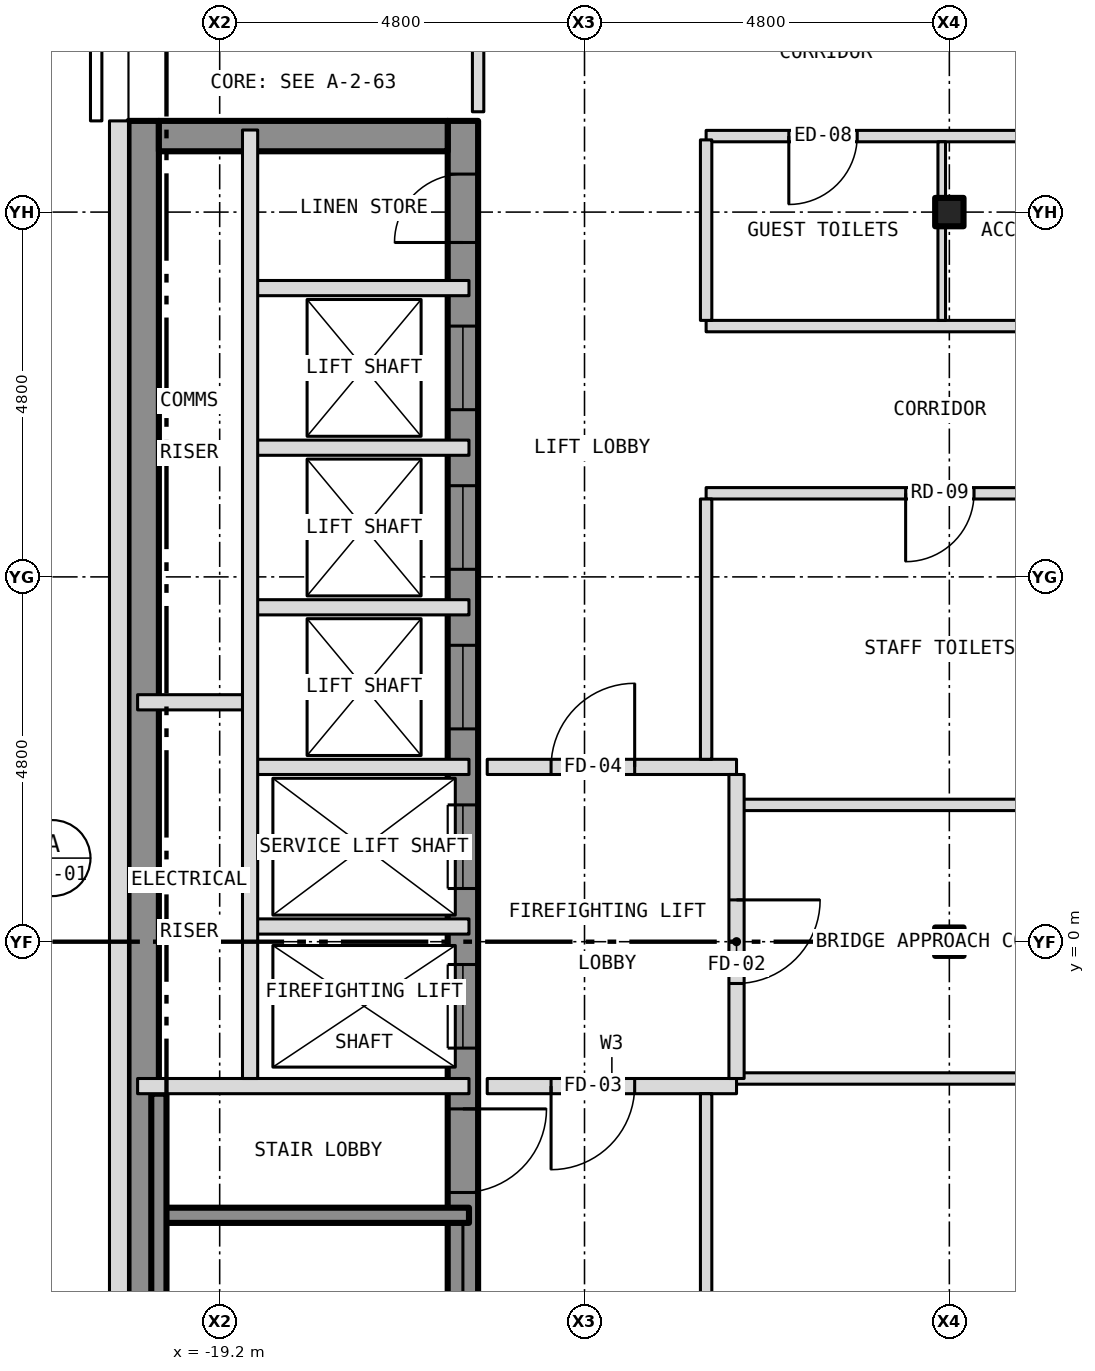
"""IFC4 building model, lengths in metres.
Left out: names, types, materials, properties, quantities, classifications, styles, units other than length and angle.
Written with IfcOpenShell. Run it as: python <this file> out.ifc"""

import sys

from ifc_helpers import new_model, si_unit, direction, frame, frame_2d, origin, origin_2d, place, context, subcontext, project, spatial, rectangle, i_section, extrude, element, fill, save


model = new_model("IFC4")
c1 = context("Model", 3, precision=1e-05, world=origin(), true_north=direction((0.0, 1.0)))
c2 = subcontext(c1, "Body", "Model", "MODEL_VIEW")
j1 = project(units=[si_unit("LENGTHUNIT", "METRE"), si_unit("PLANEANGLEUNIT", "RADIAN")], contexts=[c1])
p1 = place(None, origin())
s1 = spatial("IfcSite", under=j1, at=p1, CompositionType="ELEMENT")
p2 = place(p1, origin())
s2 = spatial("IfcBuilding", under=s1, at=p2, CompositionType="ELEMENT")
p3 = place(p2, frame((0.0, 0.0, 229.5)))
s3 = spatial("IfcBuildingStorey", under=s2, at=p3, CompositionType="ELEMENT", Elevation=229.5)
for number, where, z_axis, x_axis in (
    (1, (-9.6, 0.0, -0.15), (0.0, 0.0, 1.0), (1.0, 0.0, 0.0)),
    (2, (-9.6, 9.6, -0.15), (0.0, 0.0, 1.0), (1.0, 0.0, 0.0)),
):
    element("IfcColumn", number, at=place(p3, frame(where, z_axis=z_axis, x_axis=x_axis)), inside=s3, PredefinedType="COLUMN", context=c2, shape_type="SweptSolid", body=[
        extrude(i_section(OverallWidth=0.373, OverallDepth=0.373, WebThickness=0.016, FlangeThickness=0.026, at=origin_2d()), origin(), (0.0, 0.0, 1.0), 3.5),
    ])
p4 = place(p3, frame((-16.0, -10.8, 0.0), z_axis=(0.0, 0.0, 1.0), x_axis=(0.0, 1.0, 0.0)))
e3 = element("IfcWall", 3, at=p4, inside=s3, PredefinedType="SHEAR", context=c2, shape_type="SweptSolid", body=[
    extrude(rectangle(XDim=21.6, YDim=0.4, at=frame_2d((10.8, 0.0))), origin(), (0.0, 0.0, 1.0), 3.25),
])
p5 = place(p4, frame((9.4, 0.0, 0.0)))
e4 = element("IfcOpeningElement", 4, at=p5, cuts=e3, PredefinedType="OPENING", context=c2, shape_type="SweptSolid", body=[
    extrude(rectangle(XDim=1.1, YDim=2.1, at=frame_2d((0.55, 1.05))), frame((0.0, 0.212, 0.0), z_axis=(0.0, -1.0, 0.0), x_axis=(1.0, 0.0, 0.0)), (0.0, 0.0, 1.0), 0.424),
])
p6 = place(p4, frame((11.5, 0.0, 0.0)))
e5 = element("IfcOpeningElement", 5, at=p6, cuts=e3, PredefinedType="OPENING", context=c2, shape_type="SweptSolid", body=[
    extrude(rectangle(XDim=1.1, YDim=2.1, at=frame_2d((0.55, 1.05))), frame((0.0, 0.212, 0.0), z_axis=(0.0, -1.0, 0.0), x_axis=(1.0, 0.0, 0.0)), (0.0, 0.0, 1.0), 0.424),
])
p7 = place(p4, frame((13.6, 0.0, 0.0)))
e6 = element("IfcOpeningElement", 6, at=p7, cuts=e3, PredefinedType="OPENING", context=c2, shape_type="SweptSolid", body=[
    extrude(rectangle(XDim=1.1, YDim=2.1, at=frame_2d((0.55, 1.05))), frame((0.0, 0.212, 0.0), z_axis=(0.0, -1.0, 0.0), x_axis=(1.0, 0.0, 0.0)), (0.0, 0.0, 1.0), 0.424),
])
p8 = place(p4, frame((15.7, 0.0, 0.0)))
e7 = element("IfcOpeningElement", 7, at=p8, cuts=e3, PredefinedType="OPENING", context=c2, shape_type="SweptSolid", body=[
    extrude(rectangle(XDim=1.1, YDim=2.1, at=frame_2d((0.55, 1.05))), frame((0.0, 0.212, 0.0), z_axis=(0.0, -1.0, 0.0), x_axis=(1.0, 0.0, 0.0)), (0.0, 0.0, 1.0), 0.424),
])
p9 = place(p4, frame((17.8, 0.0, 0.0)))
e8 = element("IfcOpeningElement", 8, at=p9, cuts=e3, PredefinedType="OPENING", context=c2, shape_type="SweptSolid", body=[
    extrude(rectangle(XDim=1.1, YDim=2.1, at=frame_2d((0.55, 1.05))), frame((0.0, 0.212, 0.0), z_axis=(0.0, -1.0, 0.0), x_axis=(1.0, 0.0, 0.0)), (0.0, 0.0, 1.0), 0.424),
])
p10 = place(p4, frame((0.458, 0.0, 0.0)))
e9 = element("IfcOpeningElement", 9, at=p10, cuts=e3, PredefinedType="OPENING", context=c2, shape_type="SweptSolid", body=[
    extrude(rectangle(XDim=1.1, YDim=2.1, at=frame_2d((0.55, 1.05))), frame((0.0, 0.212, 0.0), z_axis=(0.0, -1.0, 0.0), x_axis=(1.0, 0.0, 0.0)), (0.0, 0.0, 1.0), 0.424),
])
p11 = place(p4, frame((7.5, 0.0, 0.0)))
e10 = element("IfcOpeningElement", 10, at=p11, cuts=e3, PredefinedType="OPENING", context=c2, shape_type="SweptSolid", body=[
    extrude(rectangle(XDim=1.1, YDim=2.1, at=frame_2d((0.55, 1.05))), frame((0.0, 0.212, 0.0), z_axis=(0.0, -1.0, 0.0), x_axis=(1.0, 0.0, 0.0)), (0.0, 0.0, 1.0), 0.424),
])
p12 = place(p4, frame((20.0, 0.0, 0.0)))
e11 = element("IfcOpeningElement", 11, at=p12, cuts=e3, PredefinedType="OPENING", context=c2, shape_type="SweptSolid", body=[
    extrude(rectangle(XDim=0.9, YDim=2.1, at=frame_2d((0.45, 1.05))), frame((0.0, 0.212, 0.0), z_axis=(0.0, -1.0, 0.0), x_axis=(1.0, 0.0, 0.0)), (0.0, 0.0, 1.0), 0.424),
])
p13 = place(p3, frame((-20.2, -10.8, 0.0), z_axis=(0.0, 0.0, 1.0), x_axis=(0.0, 1.0, 0.0)))
e12 = element("IfcWall", 12, at=p13, inside=s3, PredefinedType="SHEAR", context=c2, shape_type="SweptSolid", body=[
    extrude(rectangle(XDim=21.6, YDim=0.4, at=frame_2d((10.8, 0.0))), origin(), (0.0, 0.0, 1.0), 3.25),
])
p14 = place(p3, frame((-20.0, 10.6, 0.0), z_axis=(0.0, 0.0, 1.0), x_axis=(1.0, 0.0, 0.0)))
e13 = element("IfcWall", 13, at=p14, inside=s3, PredefinedType="SHEAR", context=c2, shape_type="SweptSolid", body=[
    extrude(rectangle(XDim=3.8, YDim=0.4, at=frame_2d((1.9, 0.0))), origin(), (0.0, 0.0, 1.0), 3.25),
])
p15 = place(p3, frame((-20.525, 10.8, 0.0), z_axis=(0.0, 0.0, 1.0), x_axis=(0.0, -1.0, 0.0)))
e14 = element("IfcWall", 14, at=p15, inside=s3, PredefinedType="SOLIDWALL", context=c2, shape_type="SweptSolid", body=[
    extrude(rectangle(XDim=21.6, YDim=0.25, at=frame_2d((10.8, 0.0))), origin(), (0.0, 0.0, 1.0), 3.5),
])
p16 = place(p15, frame((18.05, 0.0, 1.0)))
e15 = element("IfcOpeningElement", 15, at=p16, cuts=e14, PredefinedType="OPENING", context=c2, shape_type="SweptSolid", body=[
    extrude(rectangle(XDim=0.6, YDim=1.5, at=frame_2d((0.3, 0.75))), frame((0.0, 0.137, 0.0), z_axis=(0.0, -1.0, 0.0), x_axis=(1.0, 0.0, 0.0)), (0.0, 0.0, 1.0), 0.274),
])
p17 = place(p3, frame((-20.0, -3.6, 0.0), z_axis=(0.0, 0.0, 1.0), x_axis=(1.0, 0.0, 0.0)))
e16 = element("IfcWall", 16, at=p17, inside=s3, PredefinedType="SHEAR", context=c2, shape_type="SweptSolid", body=[
    extrude(rectangle(XDim=4.08, YDim=0.2, at=frame_2d((2.04, 0.0))), origin(), (0.0, 0.0, 1.0), 3.25),
])
p18 = place(p3, frame((-20.28, -1.9, 0.0), z_axis=(0.0, 0.0, 1.0), x_axis=(1.0, 0.0, 0.0)))
e17 = element("IfcWall", 17, at=p18, inside=s3, PredefinedType="PARTITIONING", context=c2, shape_type="SweptSolid", body=[
    extrude(rectangle(XDim=4.36, YDim=0.2, at=frame_2d((2.18, 0.0))), origin(), (0.0, 0.0, 1.0), 3.25),
])
p19 = place(p3, frame((-15.68, -1.9, 0.0), z_axis=(0.0, 0.0, 1.0), x_axis=(1.0, 0.0, 0.0)))
e18 = element("IfcWall", 18, at=p19, inside=s3, PredefinedType="PARTITIONING", context=c2, shape_type="SweptSolid", body=[
    extrude(rectangle(XDim=3.28, YDim=0.2, at=frame_2d((1.64, 0.0))), origin(), (0.0, 0.0, 1.0), 3.35),
])
p20 = place(p19, frame((0.84, 0.0, 0.0)))
e19 = element("IfcOpeningElement", 19, at=p20, cuts=e18, PredefinedType="OPENING", context=c2, shape_type="SweptSolid", body=[
    extrude(rectangle(XDim=1.1, YDim=2.1, at=frame_2d((0.55, 1.05))), frame((0.0, 0.112, 0.0), z_axis=(0.0, -1.0, 0.0), x_axis=(1.0, 0.0, 0.0)), (0.0, 0.0, 1.0), 0.224),
])
p21 = place(p3, frame((-12.4, -1.8, 0.0), z_axis=(0.0, 0.0, 1.0), x_axis=(1.0, 0.0, 0.0)))
e20 = element("IfcWall", 20, at=p21, inside=s3, PredefinedType="PARTITIONING", context=c2, shape_type="SweptSolid", body=[
    extrude(rectangle(XDim=5.78, YDim=0.15, at=frame_2d((2.89, 0.0))), origin(), (0.0, 0.0, 1.0), 3.35),
])
p22 = place(p3, frame((-18.8, 0.2, 0.0), z_axis=(0.0, 0.0, 1.0), x_axis=(1.0, 0.0, 0.0)))
e21 = element("IfcWall", 21, at=p22, inside=s3, PredefinedType="PARTITIONING", context=c2, shape_type="SweptSolid", body=[
    extrude(rectangle(XDim=2.88, YDim=0.2, at=frame_2d((1.44, 0.0))), origin(), (0.0, 0.0, 1.0), 3.25),
])
p23 = place(p3, frame((-12.4, 1.8, 0.0), z_axis=(0.0, 0.0, 1.0), x_axis=(1.0, 0.0, 0.0)))
e22 = element("IfcWall", 22, at=p23, inside=s3, PredefinedType="PARTITIONING", context=c2, shape_type="SweptSolid", body=[
    extrude(rectangle(XDim=5.78, YDim=0.15, at=frame_2d((2.89, 0.0))), origin(), (0.0, 0.0, 1.0), 3.35),
])
p24 = place(p3, frame((-18.8, 2.3, 0.0), z_axis=(0.0, 0.0, 1.0), x_axis=(1.0, 0.0, 0.0)))
e23 = element("IfcWall", 23, at=p24, inside=s3, PredefinedType="PARTITIONING", context=c2, shape_type="SweptSolid", body=[
    extrude(rectangle(XDim=2.88, YDim=0.2, at=frame_2d((1.44, 0.0))), origin(), (0.0, 0.0, 1.0), 3.25),
])
p25 = place(p3, frame((-15.68, 2.3, 0.0), z_axis=(0.0, 0.0, 1.0), x_axis=(1.0, 0.0, 0.0)))
e24 = element("IfcWall", 24, at=p25, inside=s3, PredefinedType="PARTITIONING", context=c2, shape_type="SweptSolid", body=[
    extrude(rectangle(XDim=3.28, YDim=0.2, at=frame_2d((1.64, 0.0))), origin(), (0.0, 0.0, 1.0), 3.35),
])
p26 = place(p25, frame((0.84, 0.0, 0.0)))
e25 = element("IfcOpeningElement", 25, at=p26, cuts=e24, PredefinedType="OPENING", context=c2, shape_type="SweptSolid", body=[
    extrude(rectangle(XDim=1.1, YDim=2.1, at=frame_2d((0.55, 1.05))), frame((0.0, 0.112, 0.0), z_axis=(0.0, -1.0, 0.0), x_axis=(1.0, 0.0, 0.0)), (0.0, 0.0, 1.0), 0.224),
])
p27 = place(p3, frame((-20.28, 3.15, 0.0), z_axis=(0.0, 0.0, 1.0), x_axis=(1.0, 0.0, 0.0)))
e26 = element("IfcWall", 26, at=p27, inside=s3, PredefinedType="PARTITIONING", context=c2, shape_type="SweptSolid", body=[
    extrude(rectangle(XDim=1.48, YDim=0.2, at=frame_2d((0.74, 0.0))), origin(), (0.0, 0.0, 1.0), 3.25),
])
p28 = place(p3, frame((-18.8, 4.4, 0.0), z_axis=(0.0, 0.0, 1.0), x_axis=(1.0, 0.0, 0.0)))
e27 = element("IfcWall", 27, at=p28, inside=s3, PredefinedType="PARTITIONING", context=c2, shape_type="SweptSolid", body=[
    extrude(rectangle(XDim=2.88, YDim=0.2, at=frame_2d((1.44, 0.0))), origin(), (0.0, 0.0, 1.0), 3.25),
])
p29 = place(p3, frame((-12.8, 5.9, 0.0), z_axis=(0.0, 0.0, 1.0), x_axis=(1.0, 0.0, 0.0)))
e28 = element("IfcWall", 28, at=p29, inside=s3, PredefinedType="PARTITIONING", context=c2, shape_type="SweptSolid", body=[
    extrude(rectangle(XDim=6.18, YDim=0.15, at=frame_2d((3.09, 0.0))), origin(), (0.0, 0.0, 1.0), 3.35),
])
p30 = place(p29, frame((2.625, 0.0, 0.0)))
e29 = element("IfcOpeningElement", 29, at=p30, cuts=e28, PredefinedType="OPENING", context=c2, shape_type="SweptSolid", body=[
    extrude(rectangle(XDim=0.9, YDim=2.1, at=frame_2d((0.45, 1.05))), frame((0.0, 0.087, 0.0), z_axis=(0.0, -1.0, 0.0), x_axis=(1.0, 0.0, 0.0)), (0.0, 0.0, 1.0), 0.174),
])
p31 = place(p3, frame((-18.8, 6.5, 0.0), z_axis=(0.0, 0.0, 1.0), x_axis=(1.0, 0.0, 0.0)))
e30 = element("IfcWall", 30, at=p31, inside=s3, PredefinedType="PARTITIONING", context=c2, shape_type="SweptSolid", body=[
    extrude(rectangle(XDim=2.88, YDim=0.2, at=frame_2d((1.44, 0.0))), origin(), (0.0, 0.0, 1.0), 3.25),
])
p32 = place(p3, frame((-12.8, 8.1, 0.0), z_axis=(0.0, 0.0, 1.0), x_axis=(1.0, 0.0, 0.0)))
e31 = element("IfcWall", 31, at=p32, inside=s3, PredefinedType="PARTITIONING", context=c2, shape_type="SweptSolid", body=[
    extrude(rectangle(XDim=6.15, YDim=0.15, at=frame_2d((3.075, 0.0))), origin(), (0.0, 0.0, 1.0), 3.35),
])
p33 = place(p3, frame((-18.8, 8.6, 0.0), z_axis=(0.0, 0.0, 1.0), x_axis=(1.0, 0.0, 0.0)))
e32 = element("IfcWall", 32, at=p33, inside=s3, PredefinedType="PARTITIONING", context=c2, shape_type="SweptSolid", body=[
    extrude(rectangle(XDim=2.88, YDim=0.2, at=frame_2d((1.44, 0.0))), origin(), (0.0, 0.0, 1.0), 3.25),
])
p34 = place(p3, frame((-12.8, 10.6, 0.0), z_axis=(0.0, 0.0, 1.0), x_axis=(1.0, 0.0, 0.0)))
e33 = element("IfcWall", 33, at=p34, inside=s3, PredefinedType="PARTITIONING", context=c2, shape_type="SweptSolid", body=[
    extrude(rectangle(XDim=6.15, YDim=0.15, at=frame_2d((3.075, 0.0))), origin(), (0.0, 0.0, 1.0), 3.35),
])
p35 = place(p34, frame((1.088, 0.0, 0.0)))
e34 = element("IfcOpeningElement", 34, at=p35, cuts=e33, PredefinedType="OPENING", context=c2, shape_type="SweptSolid", body=[
    extrude(rectangle(XDim=0.9, YDim=2.1, at=frame_2d((0.45, 1.05))), frame((0.0, 0.087, 0.0), z_axis=(0.0, -1.0, 0.0), x_axis=(1.0, 0.0, 0.0)), (0.0, 0.0, 1.0), 0.174),
])
p36 = place(p34, frame((4.163, 0.0, 0.0)))
e35 = element("IfcOpeningElement", 35, at=p36, cuts=e33, PredefinedType="OPENING", context=c2, shape_type="SweptSolid", body=[
    extrude(rectangle(XDim=0.9, YDim=2.1, at=frame_2d((0.45, 1.05))), frame((0.0, 0.087, 0.0), z_axis=(0.0, -1.0, 0.0), x_axis=(1.0, 0.0, 0.0)), (0.0, 0.0, 1.0), 0.174),
])
p37 = place(p3, frame((-20.0, -10.68, 0.0), z_axis=(0.0, 0.0, 1.0), x_axis=(0.0, 1.0, 0.0)))
e36 = element("IfcWall", 36, at=p37, inside=s3, PredefinedType="SHEAR", context=c2, shape_type="SweptSolid", body=[
    extrude(rectangle(XDim=8.68, YDim=0.2, at=frame_2d((4.34, 0.0))), origin(), (0.0, 0.0, 1.0), 3.25),
])
p38 = place(p3, frame((-18.8, -1.8, 0.0), z_axis=(0.0, 0.0, 1.0), x_axis=(0.0, 1.0, 0.0)))
e37 = element("IfcWall", 37, at=p38, inside=s3, PredefinedType="PARTITIONING", context=c2, shape_type="SweptSolid", body=[
    extrude(rectangle(XDim=12.48, YDim=0.2, at=frame_2d((6.24, 0.0))), origin(), (0.0, 0.0, 1.0), 3.25),
])
p39 = place(p3, frame((-15.8, 10.92, 0.0), z_axis=(0.0, 0.0, 1.0), x_axis=(0.0, 1.0, 0.0)))
e38 = element("IfcWall", 38, at=p39, inside=s3, PredefinedType="PARTITIONING", context=c2, shape_type="SweptSolid", body=[
    extrude(rectangle(XDim=1.805, YDim=0.15, at=frame_2d((0.903, 0.0))), origin(), (0.0, 0.0, 1.0), 3.35),
])
p40 = place(p3, frame((-12.8, -10.525, 0.0), z_axis=(0.0, 0.0, 1.0), x_axis=(0.0, 1.0, 0.0)))
e39 = element("IfcWall", 39, at=p40, inside=s3, PredefinedType="PARTITIONING", context=c2, shape_type="SweptSolid", body=[
    extrude(rectangle(XDim=8.525, YDim=0.15, at=frame_2d((4.262, 0.0))), origin(), (0.0, 0.0, 1.0), 3.35),
])
p41 = place(p40, frame((3.825, 0.0, 0.0)))
e40 = element("IfcOpeningElement", 40, at=p41, cuts=e39, PredefinedType="OPENING", context=c2, shape_type="SweptSolid", body=[
    extrude(rectangle(XDim=0.9, YDim=2.1, at=frame_2d((0.45, 1.05))), frame((0.0, 0.087, 0.0), z_axis=(0.0, -1.0, 0.0), x_axis=(1.0, 0.0, 0.0)), (0.0, 0.0, 1.0), 0.174),
])
p42 = place(p3, frame((-12.8, 2.4, 0.0), z_axis=(0.0, 0.0, 1.0), x_axis=(0.0, 1.0, 0.0)))
e41 = element("IfcWall", 41, at=p42, inside=s3, PredefinedType="PARTITIONING", context=c2, shape_type="SweptSolid", body=[
    extrude(rectangle(XDim=3.425, YDim=0.15, at=frame_2d((1.712, 0.0))), origin(), (0.0, 0.0, 1.0), 3.35),
])
p43 = place(p3, frame((-12.8, 8.175, 0.0), z_axis=(0.0, 0.0, 1.0), x_axis=(0.0, 1.0, 0.0)))
e42 = element("IfcWall", 42, at=p43, inside=s3, PredefinedType="PARTITIONING", context=c2, shape_type="SweptSolid", body=[
    extrude(rectangle(XDim=2.375, YDim=0.15, at=frame_2d((1.188, 0.0))), origin(), (0.0, 0.0, 1.0), 3.35),
])
p44 = place(p3, frame((-12.4, -1.8, 0.0), z_axis=(0.0, 0.0, 1.0), x_axis=(0.0, 1.0, 0.0)))
e43 = element("IfcWall", 43, at=p44, inside=s3, PredefinedType="PARTITIONING", context=c2, shape_type="SweptSolid", body=[
    extrude(rectangle(XDim=4.0, YDim=0.2, at=frame_2d((2.0, 0.0))), origin(), (0.0, 0.0, 1.0), 3.35),
])
p45 = place(p44, frame((1.25, 0.0, 0.0)))
e44 = element("IfcOpeningElement", 44, at=p45, cuts=e43, PredefinedType="OPENING", context=c2, shape_type="SweptSolid", body=[
    extrude(rectangle(XDim=1.1, YDim=2.1, at=frame_2d((0.55, 1.05))), frame((0.0, 0.112, 0.0), z_axis=(0.0, -1.0, 0.0), x_axis=(1.0, 0.0, 0.0)), (0.0, 0.0, 1.0), 0.224),
])
p46 = place(p3, frame((-9.7, 8.175, 0.0), z_axis=(0.0, 0.0, 1.0), x_axis=(0.0, 1.0, 0.0)))
e45 = element("IfcWall", 45, at=p46, inside=s3, PredefinedType="PARTITIONING", context=c2, shape_type="SweptSolid", body=[
    extrude(rectangle(XDim=1.238, YDim=0.1, at=frame_2d((0.619, 0.0))), origin(), (0.0, 0.0, 1.0), 2.728),
])
p47 = place(p3, frame((-9.7, 9.413, 0.0), z_axis=(0.0, 0.0, 1.0), x_axis=(0.0, 1.0, 0.0)))
e46 = element("IfcWall", 46, at=p47, inside=s3, PredefinedType="PARTITIONING", context=c2, shape_type="SweptSolid", body=[
    extrude(rectangle(XDim=0.374, YDim=0.1, at=frame_2d((0.187, 0.0))), origin(), (0.0, 0.0, 1.0), 3.35),
])
p48 = place(p3, frame((-9.7, 9.787, 0.0), z_axis=(0.0, 0.0, 1.0), x_axis=(0.0, 1.0, 0.0)))
e47 = element("IfcWall", 47, at=p48, inside=s3, PredefinedType="PARTITIONING", context=c2, shape_type="SweptSolid", body=[
    extrude(rectangle(XDim=0.738, YDim=0.1, at=frame_2d((0.369, 0.0))), origin(), (0.0, 0.0, 1.0), 2.728),
])
p49 = place(p5, origin())
e48 = element("IfcDoor", 48, at=p49, inside=s3, OperationType="SLIDING_TO_LEFT", PredefinedType="DOOR", context=c2, shape_type="SweptSolid", body=[
    extrude(rectangle(XDim=1.1, YDim=2.1, at=frame_2d((0.55, 1.05))), frame((0.0, 0.025, 0.0), z_axis=(0.0, -1.0, 0.0), x_axis=(1.0, 0.0, 0.0)), (0.0, 0.0, 1.0), 0.05),
])
fill(e4, e48)
p50 = place(p6, origin())
e49 = element("IfcDoor", 49, at=p50, inside=s3, OperationType="SLIDING_TO_LEFT", PredefinedType="DOOR", context=c2, shape_type="SweptSolid", body=[
    extrude(rectangle(XDim=1.1, YDim=2.1, at=frame_2d((0.55, 1.05))), frame((0.0, 0.025, 0.0), z_axis=(0.0, -1.0, 0.0), x_axis=(1.0, 0.0, 0.0)), (0.0, 0.0, 1.0), 0.05),
])
fill(e5, e49)
p51 = place(p7, origin())
e50 = element("IfcDoor", 50, at=p51, inside=s3, OperationType="SLIDING_TO_LEFT", PredefinedType="DOOR", context=c2, shape_type="SweptSolid", body=[
    extrude(rectangle(XDim=1.1, YDim=2.1, at=frame_2d((0.55, 1.05))), frame((0.0, 0.025, 0.0), z_axis=(0.0, -1.0, 0.0), x_axis=(1.0, 0.0, 0.0)), (0.0, 0.0, 1.0), 0.05),
])
fill(e6, e50)
p52 = place(p8, origin())
e51 = element("IfcDoor", 51, at=p52, inside=s3, OperationType="SLIDING_TO_LEFT", PredefinedType="DOOR", context=c2, shape_type="SweptSolid", body=[
    extrude(rectangle(XDim=1.1, YDim=2.1, at=frame_2d((0.55, 1.05))), frame((0.0, 0.025, 0.0), z_axis=(0.0, -1.0, 0.0), x_axis=(1.0, 0.0, 0.0)), (0.0, 0.0, 1.0), 0.05),
])
fill(e7, e51)
p53 = place(p9, origin())
e52 = element("IfcDoor", 52, at=p53, inside=s3, OperationType="SLIDING_TO_LEFT", PredefinedType="DOOR", context=c2, shape_type="SweptSolid", body=[
    extrude(rectangle(XDim=1.1, YDim=2.1, at=frame_2d((0.55, 1.05))), frame((0.0, 0.025, 0.0), z_axis=(0.0, -1.0, 0.0), x_axis=(1.0, 0.0, 0.0)), (0.0, 0.0, 1.0), 0.05),
])
fill(e8, e52)
p54 = place(p11, origin())
e53 = element("IfcDoor", 53, at=p54, inside=s3, OperationType="SINGLE_SWING_RIGHT", PredefinedType="DOOR", context=c2, shape_type="SweptSolid", body=[
    extrude(rectangle(XDim=1.1, YDim=2.1, at=frame_2d((0.55, 1.05))), frame((0.0, 0.025, 0.0), z_axis=(0.0, -1.0, 0.0), x_axis=(1.0, 0.0, 0.0)), (0.0, 0.0, 1.0), 0.05),
])
fill(e10, e53)
p55 = place(p12, origin())
e54 = element("IfcDoor", 54, at=p55, inside=s3, OperationType="SINGLE_SWING_LEFT", PredefinedType="DOOR", context=c2, shape_type="SweptSolid", body=[
    extrude(rectangle(XDim=0.9, YDim=2.1, at=frame_2d((0.45, 1.05))), frame((0.0, 0.025, 0.0), z_axis=(0.0, -1.0, 0.0), x_axis=(1.0, 0.0, 0.0)), (0.0, 0.0, 1.0), 0.05),
])
fill(e11, e54)
p56 = place(p45, origin())
e55 = element("IfcDoor", 55, at=p56, inside=s3, OperationType="SINGLE_SWING_RIGHT", PredefinedType="DOOR", context=c2, shape_type="SweptSolid", body=[
    extrude(rectangle(XDim=1.1, YDim=2.1, at=frame_2d((0.55, 1.05))), frame((0.0, 0.025, 0.0), z_axis=(0.0, -1.0, 0.0), x_axis=(1.0, 0.0, 0.0)), (0.0, 0.0, 1.0), 0.05),
])
fill(e44, e55)
p57 = place(p20, origin())
e56 = element("IfcDoor", 56, at=p57, inside=s3, OperationType="SINGLE_SWING_LEFT", PredefinedType="DOOR", context=c2, shape_type="SweptSolid", body=[
    extrude(rectangle(XDim=1.1, YDim=2.1, at=frame_2d((0.55, 1.05))), frame((0.0, 0.025, 0.0), z_axis=(0.0, -1.0, 0.0), x_axis=(1.0, 0.0, 0.0)), (0.0, 0.0, 1.0), 0.05),
])
fill(e19, e56)
p58 = place(p26, origin())
e57 = element("IfcDoor", 57, at=p58, inside=s3, OperationType="SINGLE_SWING_RIGHT", PredefinedType="DOOR", context=c2, shape_type="SweptSolid", body=[
    extrude(rectangle(XDim=1.1, YDim=2.1, at=frame_2d((0.55, 1.05))), frame((0.0, 0.025, 0.0), z_axis=(0.0, -1.0, 0.0), x_axis=(1.0, 0.0, 0.0)), (0.0, 0.0, 1.0), 0.05),
])
fill(e25, e57)
p59 = place(p35, origin())
e58 = element("IfcDoor", 58, at=p59, inside=s3, OperationType="SINGLE_SWING_LEFT", PredefinedType="DOOR", context=c2, shape_type="SweptSolid", body=[
    extrude(rectangle(XDim=0.9, YDim=2.1, at=frame_2d((0.45, 1.05))), frame((0.0, 0.025, 0.0), z_axis=(0.0, -1.0, 0.0), x_axis=(1.0, 0.0, 0.0)), (0.0, 0.0, 1.0), 0.05),
])
fill(e34, e58)
p60 = place(p30, origin())
e59 = element("IfcDoor", 59, at=p60, inside=s3, OperationType="SINGLE_SWING_LEFT", PredefinedType="DOOR", context=c2, shape_type="SweptSolid", body=[
    extrude(rectangle(XDim=0.9, YDim=2.1, at=frame_2d((0.45, 1.05))), frame((0.0, 0.025, 0.0), z_axis=(0.0, -1.0, 0.0), x_axis=(1.0, 0.0, 0.0)), (0.0, 0.0, 1.0), 0.05),
])
fill(e29, e59)
save(model, sys.argv[1])
